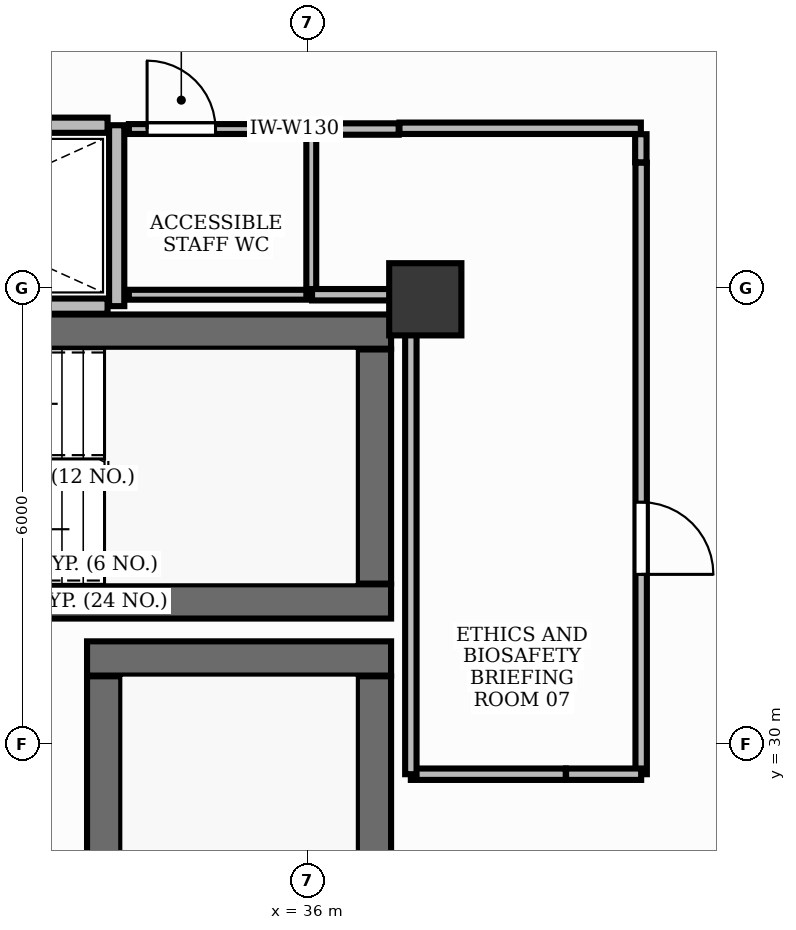
"""IFC4 building model, lengths in metres.
Left out: names, types, materials, properties, quantities, classifications, styles, units other than length and angle.
Written with IfcOpenShell. Run it as: python <this file> out.ifc"""

import sys

from ifc_helpers import new_model, si_unit, direction, frame, frame_2d, origin, origin_2d, place, context, subcontext, project, spatial, rectangle, extrude, element, fill, save


model = new_model("IFC4")
c1 = context("Model", 3, precision=1e-05, world=origin(), true_north=direction((0.0, 1.0)))
c2 = subcontext(c1, "Body", "Model", "MODEL_VIEW")
j1 = project(units=[si_unit("LENGTHUNIT", "METRE"), si_unit("PLANEANGLEUNIT", "RADIAN")], contexts=[c1])
p1 = place(None, origin())
s1 = spatial("IfcSite", under=j1, at=p1, CompositionType="ELEMENT")
p2 = place(p1, origin())
s2 = spatial("IfcBuilding", under=s1, at=p2, CompositionType="ELEMENT")
p3 = place(p2, frame((0.0, 0.0, 127.8)))
s3 = spatial("IfcBuildingStorey", under=s2, at=p3, CompositionType="ELEMENT", Elevation=127.8)
p4 = place(p3, frame((28.852, 35.425, 0.0), z_axis=(0.0, 0.0, 1.0), x_axis=(1.0, 0.0, 0.0)))
e1 = element("IfcWall", 1, at=p4, inside=s3, PredefinedType="SHEAR", context=c2, shape_type="SweptSolid", body=[
    extrude(rectangle(XDim=8.248, YDim=0.45, at=frame_2d((4.124, 0.0))), origin(), (0.0, 0.0, 1.0), 3.9),
])
p5 = place(p3, frame((28.35, 31.875, 0.0), z_axis=(0.0, 0.0, 1.0), x_axis=(1.0, 0.0, 0.0)))
e2 = element("IfcWall", 2, at=p5, inside=s3, PredefinedType="SHEAR", context=c2, shape_type="SweptSolid", body=[
    extrude(rectangle(XDim=8.75, YDim=0.45, at=frame_2d((4.375, 0.0))), origin(), (0.0, 0.0, 1.0), 3.9),
])
p6 = place(p3, frame((36.875, 32.11, 0.0), z_axis=(0.0, 0.0, 1.0), x_axis=(0.0, 1.0, 0.0)))
e3 = element("IfcWall", 3, at=p6, inside=s3, PredefinedType="SHEAR", context=c2, shape_type="SweptSolid", body=[
    extrude(rectangle(XDim=3.08, YDim=0.45, at=frame_2d((1.54, 0.0))), origin(), (0.0, 0.0, 1.0), 3.9),
])
p7 = place(p3, frame((33.1, 31.125, 0.0), z_axis=(0.0, 0.0, 1.0), x_axis=(1.0, 0.0, 0.0)))
e4 = element("IfcWall", 4, at=p7, inside=s3, PredefinedType="SHEAR", context=c2, shape_type="SweptSolid", body=[
    extrude(rectangle(XDim=4.0, YDim=0.45, at=frame_2d((2.0, 0.0))), origin(), (0.0, 0.0, 1.0), 3.9),
])
p8 = place(p3, frame((36.875, 23.11, 0.0), z_axis=(0.0, 0.0, 1.0), x_axis=(0.0, 1.0, 0.0)))
e5 = element("IfcWall", 5, at=p8, inside=s3, PredefinedType="SHEAR", context=c2, shape_type="SweptSolid", body=[
    extrude(rectangle(XDim=7.78, YDim=0.45, at=frame_2d((3.89, 0.0))), origin(), (0.0, 0.0, 1.0), 3.9),
])
p9 = place(p3, frame((33.325, 23.11, 0.0), z_axis=(0.0, 0.0, 1.0), x_axis=(0.0, 1.0, 0.0)))
e6 = element("IfcWall", 6, at=p9, inside=s3, PredefinedType="SHEAR", context=c2, shape_type="SweptSolid", body=[
    extrude(rectangle(XDim=7.78, YDim=0.45, at=frame_2d((3.89, 0.0))), origin(), (0.0, 0.0, 1.0), 3.9),
])
p10 = place(p9, frame((0.2, 0.0, 0.0)))
e7 = element("IfcOpeningElement", 7, at=p10, cuts=e6, PredefinedType="OPENING", context=c2, shape_type="SweptSolid", body=[
    extrude(rectangle(XDim=1.05, YDim=2.15, at=frame_2d((0.525, 1.075))), frame((0.0, 0.24, 0.0), z_axis=(0.0, -1.0, 0.0), x_axis=(1.0, 0.0, 0.0)), (0.0, 0.0, 1.0), 0.48),
])
p11 = place(p3, frame((37.55, 35.85, -0.0), z_axis=(0.0, 0.0, 1.0), x_axis=(1.0, 0.0, 0.0)))
e8 = element("IfcColumn", 8, at=p11, inside=s3, PredefinedType="PILASTER", context=c2, shape_type="SweptSolid", body=[
    extrude(rectangle(XDim=0.95, YDim=0.95, at=origin_2d()), origin(), (0.0, 0.0, 1.0), 3.901),
])
p12 = place(p3, frame((33.49, 35.76, 0.0), z_axis=(0.0, 0.0, 1.0), x_axis=(0.0, 1.0, 0.0)))
e9 = element("IfcWall", 9, at=p12, inside=s3, PredefinedType="PARTITIONING", context=c2, shape_type="SweptSolid", body=[
    extrude(rectangle(XDim=2.38, YDim=0.2, at=frame_2d((1.19, 0.0))), origin(), (0.0, 0.0, 1.0), 2.91),
])
for number, where, z_axis, x_axis in (
    (10, (28.8, 35.76, 0.0), (0.0, 0.0, 1.0), (1.0, 0.0, 0.0)),
    (11, (28.8, 38.14, 0.0), (0.0, 0.0, 1.0), (1.0, 0.0, 0.0)),
):
    element("IfcWall", number, at=place(p3, frame(where, z_axis=z_axis, x_axis=x_axis)), inside=s3, PredefinedType="PARTITIONING", context=c2, shape_type="SweptSolid", body=[
        extrude(rectangle(XDim=4.57, YDim=0.2, at=frame_2d((2.285, 0.0))), origin(), (0.0, 0.0, 1.0), 2.91),
    ])
p13 = place(p3, frame((33.65, 38.09, 0.0), z_axis=(0.0, 0.0, 1.0), x_axis=(1.0, 0.0, 0.0)))
e12 = element("IfcWall", 12, at=p13, inside=s3, PredefinedType="PARTITIONING", context=c2, shape_type="SweptSolid", body=[
    extrude(rectangle(XDim=2.4, YDim=0.13, at=frame_2d((1.2, 0.0))), origin(), (0.0, 0.0, 1.0), 2.91),
])
p14 = place(p13, frame((0.24, 0.0, 0.0)))
e13 = element("IfcOpeningElement", 13, at=p14, cuts=e12, PredefinedType="OPENING", context=c2, shape_type="SweptSolid", body=[
    extrude(rectangle(XDim=0.9, YDim=2.15, at=frame_2d((0.45, 1.075))), frame((0.0, 0.08, 0.0), z_axis=(0.0, -1.0, 0.0), x_axis=(1.0, 0.0, 0.0)), (0.0, 0.0, 1.0), 0.16),
])
p15 = place(p3, frame((40.39, 37.648, 0.0), z_axis=(0.0, 0.0, 1.0), x_axis=(0.0, -1.0, 0.0)))
e14 = element("IfcWall", 14, at=p15, inside=s3, PredefinedType="PARTITIONING", context=c2, shape_type="SweptSolid", body=[
    extrude(rectangle(XDim=8.046, YDim=0.15, at=frame_2d((4.023, 0.0))), origin(), (0.0, 0.0, 1.0), 2.91),
])
p16 = place(p15, frame((4.467, 0.0, 0.0)))
e15 = element("IfcOpeningElement", 15, at=p16, cuts=e14, PredefinedType="OPENING", context=c2, shape_type="SweptSolid", body=[
    extrude(rectangle(XDim=0.95, YDim=2.15, at=frame_2d((0.475, 1.075))), frame((0.0, 0.09, 0.0), z_axis=(0.0, -1.0, 0.0), x_axis=(1.0, 0.0, 0.0)), (0.0, 0.0, 1.0), 0.18),
])
p17 = place(p3, frame((36.05, 35.91, 0.0), z_axis=(0.0, 0.0, 1.0), x_axis=(-1.0, 0.0, 0.0)))
e16 = element("IfcWall", 16, at=p17, inside=s3, PredefinedType="PARTITIONING", context=c2, shape_type="SweptSolid", body=[
    extrude(rectangle(XDim=2.4, YDim=0.13, at=frame_2d((1.2, 0.0))), origin(), (0.0, 0.0, 1.0), 2.91),
])
p18 = place(p3, frame((36.05, 38.09, 0.0), z_axis=(0.0, 0.0, 1.0), x_axis=(0.0, -1.0, 0.0)))
e17 = element("IfcWall", 17, at=p18, inside=s3, PredefinedType="PARTITIONING", context=c2, shape_type="SweptSolid", body=[
    extrude(rectangle(XDim=2.18, YDim=0.13, at=frame_2d((1.09, 0.0))), origin(), (0.0, 0.0, 1.0), 2.91),
])
p19 = place(p3, frame((40.39, 29.602, 0.0), z_axis=(0.0, 0.0, 1.0), x_axis=(-1.0, 0.0, 0.0)))
e18 = element("IfcWall", 18, at=p19, inside=s3, PredefinedType="PARTITIONING", context=c2, shape_type="SweptSolid", body=[
    extrude(rectangle(XDim=0.988, YDim=0.15, at=frame_2d((0.494, 0.0))), origin(), (0.0, 0.0, 1.0), 2.91),
])
p20 = place(p3, frame((39.398, 29.602, 0.0), z_axis=(0.0, 0.0, 1.0), x_axis=(-1.0, 0.0, 0.0)))
e19 = element("IfcWall", 19, at=p20, inside=s3, PredefinedType="PARTITIONING", context=c2, shape_type="SweptSolid", body=[
    extrude(rectangle(XDim=2.038, YDim=0.15, at=frame_2d((1.019, 0.0))), origin(), (0.0, 0.0, 1.0), 2.91),
])
p21 = place(p3, frame((37.36, 29.602, 0.0), z_axis=(0.0, 0.0, 1.0), x_axis=(0.0, 1.0, 0.0)))
e20 = element("IfcWall", 20, at=p21, inside=s3, PredefinedType="PARTITIONING", context=c2, shape_type="SweptSolid", body=[
    extrude(rectangle(XDim=6.298, YDim=0.15, at=frame_2d((3.149, 0.0))), origin(), (0.0, 0.0, 1.0), 2.91),
])
p22 = place(p3, frame((37.35, 35.91, 0.0), z_axis=(0.0, 0.0, 1.0), x_axis=(-1.0, 0.0, 0.0)))
e21 = element("IfcWall", 21, at=p22, inside=s3, PredefinedType="PARTITIONING", context=c2, shape_type="SweptSolid", body=[
    extrude(rectangle(XDim=1.29, YDim=0.15, at=frame_2d((0.645, 0.0))), origin(), (0.0, 0.0, 1.0), 2.91),
])
p23 = place(p3, frame((36.06, 38.09, 0.0), z_axis=(0.0, 0.0, 1.0), x_axis=(1.0, 0.0, 0.0)))
e22 = element("IfcWall", 22, at=p23, inside=s3, PredefinedType="PARTITIONING", context=c2, shape_type="SweptSolid", body=[
    extrude(rectangle(XDim=1.14, YDim=0.15, at=frame_2d((0.57, 0.0))), origin(), (0.0, 0.0, 1.0), 2.91),
])
p24 = place(p3, frame((37.21, 38.1, 0.0), z_axis=(0.0, 0.0, 1.0), x_axis=(1.0, 0.0, 0.0)))
e23 = element("IfcWall", 23, at=p24, inside=s3, PredefinedType="PARTITIONING", context=c2, shape_type="SweptSolid", body=[
    extrude(rectangle(XDim=3.176, YDim=0.15, at=frame_2d((1.588, 0.0))), origin(), (0.0, 0.0, 1.0), 2.91),
])
p25 = place(p3, frame((40.386, 38.022, 0.0), z_axis=(0.0, 0.0, 1.0), x_axis=(0.0, -1.0, 0.0)))
e24 = element("IfcWall", 24, at=p25, inside=s3, PredefinedType="PARTITIONING", context=c2, shape_type="SweptSolid", body=[
    extrude(rectangle(XDim=0.37, YDim=0.15, at=frame_2d((0.185, 0.0))), origin(), (0.0, 0.0, 1.0), 2.91),
])
p26 = place(p14, origin())
e25 = element("IfcDoor", 25, at=p26, inside=s3, OperationType="SINGLE_SWING_LEFT", PredefinedType="DOOR", context=c2, shape_type="SweptSolid", body=[
    extrude(rectangle(XDim=0.9, YDim=2.15, at=frame_2d((0.45, 1.075))), frame((0.0, 0.025, 0.0), z_axis=(0.0, -1.0, 0.0), x_axis=(1.0, 0.0, 0.0)), (0.0, 0.0, 1.0), 0.05),
])
fill(e13, e25)
p27 = place(p16, origin())
e26 = element("IfcDoor", 26, at=p27, inside=s3, OperationType="SINGLE_SWING_RIGHT", PredefinedType="DOOR", context=c2, shape_type="SweptSolid", body=[
    extrude(rectangle(XDim=0.95, YDim=2.15, at=frame_2d((0.475, 1.075))), frame((0.0, 0.025, 0.0), z_axis=(0.0, -1.0, 0.0), x_axis=(1.0, 0.0, 0.0)), (0.0, 0.0, 1.0), 0.05),
])
fill(e15, e26)
save(model, sys.argv[1])
